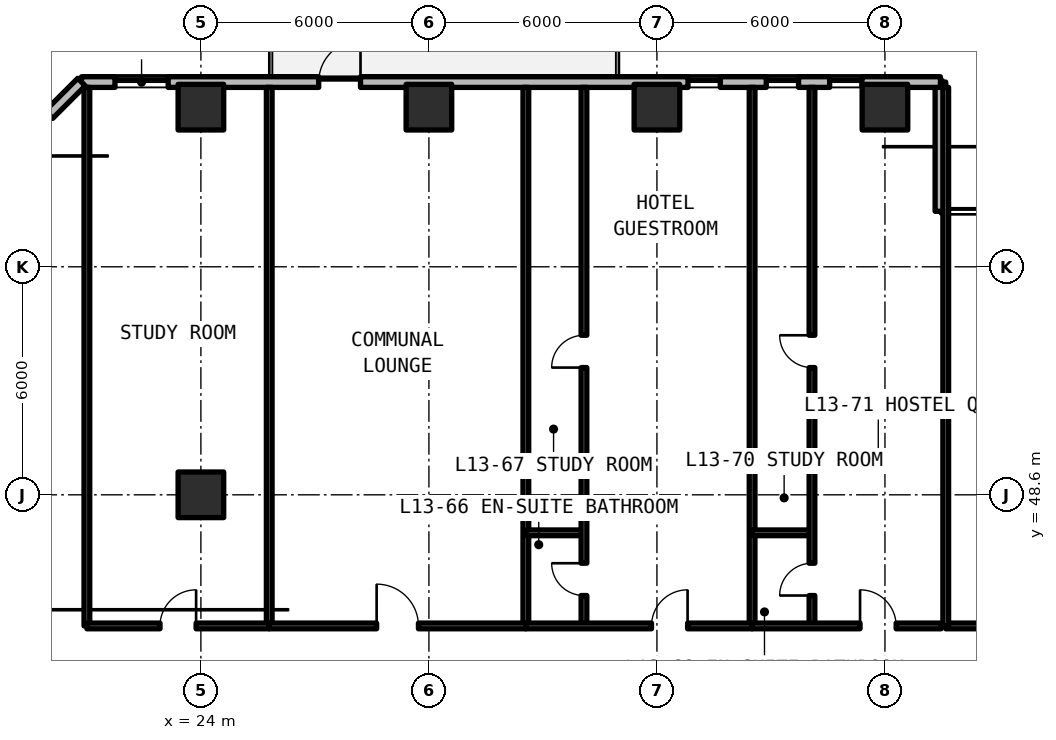
"""IFC4 building model, lengths in metres.
Left out: names, types, materials, properties, quantities, classifications, styles, units other than length and angle.
Written with IfcOpenShell. Run it as: python <this file> out.ifc"""

import sys

from ifc_helpers import new_model, si_unit, direction, frame, frame_2d, origin, origin_2d, place, context, subcontext, project, spatial, rectangle, extrude, element, fill, save


model = new_model("IFC4")
c1 = context("Model", 3, precision=1e-05, world=origin(), true_north=direction((0.0, 1.0)))
c2 = subcontext(c1, "Body", "Model", "MODEL_VIEW")
j1 = project(units=[si_unit("LENGTHUNIT", "METRE"), si_unit("PLANEANGLEUNIT", "RADIAN")], contexts=[c1])
p1 = place(None, origin())
s1 = spatial("IfcSite", under=j1, at=p1, CompositionType="ELEMENT")
p2 = place(p1, origin())
s2 = spatial("IfcBuilding", under=s1, at=p2, CompositionType="ELEMENT")
p3 = place(p2, frame((0.0, 0.0, 48.84)))
s3 = spatial("IfcBuildingStorey", under=s2, at=p3, CompositionType="ELEMENT", Elevation=48.84)
for number, where, z_axis, x_axis in (
    (1, (24.0, 48.6, 0.0), (0.0, 0.0, 1.0), (1.0, 0.0, 0.0)),
    (2, (24.0, 58.8, 0.0), (0.0, 0.0, 1.0), (1.0, 0.0, 0.0)),
    (3, (30.0, 58.8, 0.0), (0.0, 0.0, 1.0), (1.0, 0.0, 0.0)),
    (4, (36.0, 58.8, 0.0), (0.0, 0.0, 1.0), (1.0, 0.0, 0.0)),
    (5, (42.0, 58.8, 0.0), (0.0, 0.0, 1.0), (1.0, 0.0, 0.0)),
):
    element("IfcColumn", number, at=place(p3, frame(where, z_axis=z_axis, x_axis=x_axis)), inside=s3, PredefinedType="COLUMN", context=c2, shape_type="SweptSolid", body=[
        extrude(rectangle(XDim=1.2, YDim=1.2, at=origin_2d()), origin(), (0.0, 0.0, 1.0), 3.3),
    ])
p4 = place(p3, frame((43.46, 56.06, 0.0), z_axis=(0.0, 0.0, 1.0), x_axis=(0.0, 1.0, 0.0)))
e6 = element("IfcWall", 6, at=p4, inside=s3, PredefinedType="SOLIDWALL", context=c2, shape_type="SweptSolid", body=[
    extrude(rectangle(XDim=3.4, YDim=0.28, at=frame_2d((1.7, 0.0))), origin(), (0.0, 0.0, 1.0), 3.08),
])
p5 = place(p3, frame((43.46, 59.46, 0.0), z_axis=(0.0, 0.0, 1.0), x_axis=(-1.0, 0.0, 0.0)))
e7 = element("IfcWall", 7, at=p5, inside=s3, PredefinedType="SOLIDWALL", context=c2, shape_type="SweptSolid", body=[
    extrude(rectangle(XDim=22.602, YDim=0.28, at=frame_2d((11.301, 0.0))), origin(), (0.0, 0.0, 1.0), 3.08),
])
p6 = place(p5, frame((15.26, 0.0, 0.0)))
e8 = element("IfcOpeningElement", 8, at=p6, cuts=e7, PredefinedType="OPENING", context=c2, shape_type="SweptSolid", body=[
    extrude(rectangle(XDim=1.1, YDim=2.15, at=frame_2d((0.55, 1.075))), frame((0.0, 0.15, 0.0), z_axis=(0.0, -1.0, 0.0), x_axis=(1.0, 0.0, 0.0)), (0.0, 0.0, 1.0), 0.3),
])
p7 = place(p5, frame((20.321, 0.0, 0.78)))
e9 = element("IfcOpeningElement", 9, at=p7, cuts=e7, PredefinedType="OPENING", context=c2, shape_type="SweptSolid", body=[
    extrude(rectangle(XDim=1.4, YDim=1.65, at=frame_2d((0.7, 0.825))), frame((0.0, 0.15, 0.0), z_axis=(0.0, -1.0, 0.0), x_axis=(1.0, 0.0, 0.0)), (0.0, 0.0, 1.0), 0.3),
])
p8 = place(p5, frame((5.793, 0.0, 0.78)))
e10 = element("IfcOpeningElement", 10, at=p8, cuts=e7, PredefinedType="OPENING", context=c2, shape_type="SweptSolid", body=[
    extrude(rectangle(XDim=0.85, YDim=1.65, at=frame_2d((0.425, 0.825))), frame((0.0, 0.15, 0.0), z_axis=(0.0, -1.0, 0.0), x_axis=(1.0, 0.0, 0.0)), (0.0, 0.0, 1.0), 0.3),
])
p9 = place(p5, frame((3.733, 0.0, 0.78)))
e11 = element("IfcOpeningElement", 11, at=p9, cuts=e7, PredefinedType="OPENING", context=c2, shape_type="SweptSolid", body=[
    extrude(rectangle(XDim=0.85, YDim=1.65, at=frame_2d((0.425, 0.825))), frame((0.0, 0.15, 0.0), z_axis=(0.0, -1.0, 0.0), x_axis=(1.0, 0.0, 0.0)), (0.0, 0.0, 1.0), 0.3),
])
p10 = place(p5, frame((2.065, 0.0, 0.78)))
e12 = element("IfcOpeningElement", 12, at=p10, cuts=e7, PredefinedType="OPENING", context=c2, shape_type="SweptSolid", body=[
    extrude(rectangle(XDim=0.85, YDim=1.65, at=frame_2d((0.425, 0.825))), frame((0.0, 0.15, 0.0), z_axis=(0.0, -1.0, 0.0), x_axis=(1.0, 0.0, 0.0)), (0.0, 0.0, 1.0), 0.3),
])
p11 = place(p3, frame((20.858, 59.46, 0.0), z_axis=(0.0, 0.0, 1.0), x_axis=(-0.707106781187, -0.707106781187, 0.0)))
e13 = element("IfcWall", 13, at=p11, inside=s3, PredefinedType="SOLIDWALL", context=c2, shape_type="SweptSolid", body=[
    extrude(rectangle(XDim=5.824, YDim=0.28, at=frame_2d((2.912, 0.0))), origin(), (0.0, 0.0, 1.0), 3.08),
])
p12 = place(p11, frame((1.212, 0.0, 0.78)))
e14 = element("IfcOpeningElement", 14, at=p12, cuts=e13, PredefinedType="OPENING", context=c2, shape_type="SweptSolid", body=[
    extrude(rectangle(XDim=3.4, YDim=1.66, at=frame_2d((1.7, 0.83))), frame((0.0, 0.15, 0.0), z_axis=(0.0, -1.0, 0.0), x_axis=(1.0, 0.0, 0.0)), (0.0, 0.0, 1.0), 0.3),
])
p13 = place(p3, frame((43.6, 45.15, 0.0), z_axis=(0.0, 0.0, 1.0), x_axis=(1.0, 0.0, 0.0)))
e15 = element("IfcWall", 15, at=p13, inside=s3, PredefinedType="SOLIDWALL", context=c2, shape_type="SweptSolid", body=[
    extrude(rectangle(XDim=8.4, YDim=0.15, at=frame_2d((4.2, 0.0))), origin(), (0.0, 0.0, 1.0), 2.35),
])
p14 = place(p13, frame((3.65, 0.0, 0.0)))
e16 = element("IfcOpeningElement", 16, at=p14, cuts=e15, PredefinedType="OPENING", context=c2, shape_type="SweptSolid", body=[
    extrude(rectangle(XDim=1.1, YDim=2.15, at=frame_2d((0.55, 1.075))), frame((0.0, 0.085, 0.0), z_axis=(0.0, -1.0, 0.0), x_axis=(1.0, 0.0, 0.0)), (0.0, 0.0, 1.0), 0.17),
])
for number, where, z_axis, x_axis in (
    (17, (43.6, 45.15, 0.0), (0.0, 0.0, 1.0), (0.0, 1.0, 0.0)),
    (18, (21.0, 45.15, 0.0), (0.0, 0.0, 1.0), (0.0, 1.0, 0.0)),
    (19, (25.798, 45.15, 0.0), (0.0, 0.0, 1.0), (0.0, 1.0, 0.0)),
):
    element("IfcWall", number, at=place(p3, frame(where, z_axis=z_axis, x_axis=x_axis)), inside=s3, PredefinedType="SOLIDWALL", context=c2, shape_type="SweptSolid", body=[
        extrude(rectangle(XDim=14.17, YDim=0.15, at=frame_2d((7.085, 0.0))), origin(), (0.0, 0.0, 1.0), 2.35),
    ])
p15 = place(p3, frame((21.0, 45.15, 0.0), z_axis=(0.0, 0.0, 1.0), x_axis=(1.0, 0.0, 0.0)))
e20 = element("IfcWall", 20, at=p15, inside=s3, PredefinedType="SOLIDWALL", context=c2, shape_type="SweptSolid", body=[
    extrude(rectangle(XDim=4.798, YDim=0.15, at=frame_2d((2.399, 0.0))), origin(), (0.0, 0.0, 1.0), 2.35),
])
p16 = place(p15, frame((1.924, 0.0, 0.0)))
e21 = element("IfcOpeningElement", 21, at=p16, cuts=e20, PredefinedType="OPENING", context=c2, shape_type="SweptSolid", body=[
    extrude(rectangle(XDim=0.95, YDim=2.15, at=frame_2d((0.475, 1.075))), frame((0.0, 0.085, 0.0), z_axis=(0.0, -1.0, 0.0), x_axis=(1.0, 0.0, 0.0)), (0.0, 0.0, 1.0), 0.17),
])
p17 = place(p3, frame((32.551, 45.15, 0.0), z_axis=(0.0, 0.0, 1.0), x_axis=(0.0, 1.0, 0.0)))
e22 = element("IfcWall", 22, at=p17, inside=s3, PredefinedType="SOLIDWALL", context=c2, shape_type="SweptSolid", body=[
    extrude(rectangle(XDim=14.17, YDim=0.15, at=frame_2d((7.085, 0.0))), origin(), (0.0, 0.0, 1.0), 2.35),
])
p18 = place(p3, frame((25.798, 45.15, 0.0), z_axis=(0.0, 0.0, 1.0), x_axis=(1.0, 0.0, 0.0)))
e23 = element("IfcWall", 23, at=p18, inside=s3, PredefinedType="SOLIDWALL", context=c2, shape_type="SweptSolid", body=[
    extrude(rectangle(XDim=6.753, YDim=0.15, at=frame_2d((3.376, 0.0))), origin(), (0.0, 0.0, 1.0), 2.35),
])
p19 = place(p18, frame((2.826, 0.0, 0.0)))
e24 = element("IfcOpeningElement", 24, at=p19, cuts=e23, PredefinedType="OPENING", context=c2, shape_type="SweptSolid", body=[
    extrude(rectangle(XDim=1.1, YDim=2.15, at=frame_2d((0.55, 1.075))), frame((0.0, 0.085, 0.0), z_axis=(0.0, -1.0, 0.0), x_axis=(1.0, 0.0, 0.0)), (0.0, 0.0, 1.0), 0.17),
])
p20 = place(p3, frame((38.504, 45.15, 0.0), z_axis=(0.0, 0.0, 1.0), x_axis=(0.0, 1.0, 0.0)))
e25 = element("IfcWall", 25, at=p20, inside=s3, PredefinedType="SOLIDWALL", context=c2, shape_type="SweptSolid", body=[
    extrude(rectangle(XDim=14.17, YDim=0.15, at=frame_2d((7.085, 0.0))), origin(), (0.0, 0.0, 1.0), 2.35),
])
p21 = place(p3, frame((32.551, 47.6, 0.0), z_axis=(0.0, 0.0, 1.0), x_axis=(1.0, 0.0, 0.0)))
e26 = element("IfcWall", 26, at=p21, inside=s3, PredefinedType="PARTITIONING", context=c2, shape_type="SweptSolid", body=[
    extrude(rectangle(XDim=1.529, YDim=0.15, at=frame_2d((0.765, 0.0))), origin(), (0.0, 0.0, 1.0), 2.35),
])
p22 = place(p3, frame((34.08, 45.15, 0.0), z_axis=(0.0, 0.0, 1.0), x_axis=(0.0, 1.0, 0.0)))
e27 = element("IfcWall", 27, at=p22, inside=s3, PredefinedType="PARTITIONING", context=c2, shape_type="SweptSolid", body=[
    extrude(rectangle(XDim=14.17, YDim=0.15, at=frame_2d((7.085, 0.0))), origin(), (0.0, 0.0, 1.0), 2.35),
])
p23 = place(p22, frame((0.8, 0.0, 0.0)))
e28 = element("IfcOpeningElement", 28, at=p23, cuts=e27, PredefinedType="OPENING", context=c2, shape_type="SweptSolid", body=[
    extrude(rectangle(XDim=0.85, YDim=2.1, at=frame_2d((0.425, 1.05))), frame((0.0, 0.085, 0.0), z_axis=(0.0, -1.0, 0.0), x_axis=(1.0, 0.0, 0.0)), (0.0, 0.0, 1.0), 0.17),
])
p24 = place(p22, frame((6.798, 0.0, 0.0)))
e29 = element("IfcOpeningElement", 29, at=p24, cuts=e27, PredefinedType="OPENING", context=c2, shape_type="SweptSolid", body=[
    extrude(rectangle(XDim=0.85, YDim=2.1, at=frame_2d((0.425, 1.05))), frame((0.0, 0.085, 0.0), z_axis=(0.0, -1.0, 0.0), x_axis=(1.0, 0.0, 0.0)), (0.0, 0.0, 1.0), 0.17),
])
p25 = place(p3, frame((32.551, 45.15, 0.0), z_axis=(0.0, 0.0, 1.0), x_axis=(1.0, 0.0, 0.0)))
e30 = element("IfcWall", 30, at=p25, inside=s3, PredefinedType="SOLIDWALL", context=c2, shape_type="SweptSolid", body=[
    extrude(rectangle(XDim=5.953, YDim=0.15, at=frame_2d((2.977, 0.0))), origin(), (0.0, 0.0, 1.0), 2.35),
])
p26 = place(p25, frame((3.306, 0.0, 0.0)))
e31 = element("IfcOpeningElement", 31, at=p26, cuts=e30, PredefinedType="OPENING", context=c2, shape_type="SweptSolid", body=[
    extrude(rectangle(XDim=0.95, YDim=2.15, at=frame_2d((0.475, 1.075))), frame((0.0, 0.085, 0.0), z_axis=(0.0, -1.0, 0.0), x_axis=(1.0, 0.0, 0.0)), (0.0, 0.0, 1.0), 0.17),
])
p27 = place(p3, frame((38.504, 47.6, 0.0), z_axis=(0.0, 0.0, 1.0), x_axis=(1.0, 0.0, 0.0)))
e32 = element("IfcWall", 32, at=p27, inside=s3, PredefinedType="PARTITIONING", context=c2, shape_type="SweptSolid", body=[
    extrude(rectangle(XDim=1.576, YDim=0.15, at=frame_2d((0.788, 0.0))), origin(), (0.0, 0.0, 1.0), 2.35),
])
p28 = place(p3, frame((40.08, 45.15, 0.0), z_axis=(0.0, 0.0, 1.0), x_axis=(0.0, 1.0, 0.0)))
e33 = element("IfcWall", 33, at=p28, inside=s3, PredefinedType="PARTITIONING", context=c2, shape_type="SweptSolid", body=[
    extrude(rectangle(XDim=14.17, YDim=0.15, at=frame_2d((7.085, 0.0))), origin(), (0.0, 0.0, 1.0), 2.35),
])
p29 = place(p28, frame((0.8, 0.0, 0.0)))
e34 = element("IfcOpeningElement", 34, at=p29, cuts=e33, PredefinedType="OPENING", context=c2, shape_type="SweptSolid", body=[
    extrude(rectangle(XDim=0.85, YDim=2.1, at=frame_2d((0.425, 1.05))), frame((0.0, 0.085, 0.0), z_axis=(0.0, -1.0, 0.0), x_axis=(1.0, 0.0, 0.0)), (0.0, 0.0, 1.0), 0.17),
])
p30 = place(p28, frame((6.798, 0.0, 0.0)))
e35 = element("IfcOpeningElement", 35, at=p30, cuts=e33, PredefinedType="OPENING", context=c2, shape_type="SweptSolid", body=[
    extrude(rectangle(XDim=0.85, YDim=2.1, at=frame_2d((0.425, 1.05))), frame((0.0, 0.085, 0.0), z_axis=(0.0, -1.0, 0.0), x_axis=(1.0, 0.0, 0.0)), (0.0, 0.0, 1.0), 0.17),
])
p31 = place(p3, frame((38.504, 45.15, 0.0), z_axis=(0.0, 0.0, 1.0), x_axis=(1.0, 0.0, 0.0)))
e36 = element("IfcWall", 36, at=p31, inside=s3, PredefinedType="SOLIDWALL", context=c2, shape_type="SweptSolid", body=[
    extrude(rectangle(XDim=4.976, YDim=0.15, at=frame_2d((2.488, 0.0))), origin(), (0.0, 0.0, 1.0), 2.35),
])
p32 = place(p31, frame((2.841, 0.0, 0.0)))
e37 = element("IfcOpeningElement", 37, at=p32, cuts=e36, PredefinedType="OPENING", context=c2, shape_type="SweptSolid", body=[
    extrude(rectangle(XDim=0.95, YDim=2.15, at=frame_2d((0.475, 1.075))), frame((0.0, 0.085, 0.0), z_axis=(0.0, -1.0, 0.0), x_axis=(1.0, 0.0, 0.0)), (0.0, 0.0, 1.0), 0.17),
])
p33 = place(p6, frame((1.1, 0.0, 0.0), z_axis=(0.0, 0.0, 1.0), x_axis=(-1.0, 0.0, 0.0)))
e38 = element("IfcDoor", 38, at=p33, inside=s3, OperationType="SINGLE_SWING_LEFT", PredefinedType="DOOR", context=c2, shape_type="SweptSolid", body=[
    extrude(rectangle(XDim=1.1, YDim=2.15, at=frame_2d((0.55, 1.075))), frame((0.0, 0.025, 0.0), z_axis=(0.0, -1.0, 0.0), x_axis=(1.0, 0.0, 0.0)), (0.0, 0.0, 1.0), 0.05),
])
fill(e8, e38)
p34 = place(p7, origin())
e39 = element("IfcWindow", 39, at=p34, inside=s3, PartitioningType="SINGLE_PANEL", PredefinedType="WINDOW", context=c2, shape_type="SweptSolid", body=[
    extrude(rectangle(XDim=1.4, YDim=1.65, at=frame_2d((0.7, 0.825))), frame((0.0, 0.03, 0.0), z_axis=(0.0, -1.0, 0.0), x_axis=(1.0, 0.0, 0.0)), (0.0, 0.0, 1.0), 0.06),
])
fill(e9, e39)
p35 = place(p8, origin())
e40 = element("IfcWindow", 40, at=p35, inside=s3, PartitioningType="SINGLE_PANEL", PredefinedType="WINDOW", context=c2, shape_type="SweptSolid", body=[
    extrude(rectangle(XDim=0.85, YDim=1.65, at=frame_2d((0.425, 0.825))), frame((0.0, 0.03, 0.0), z_axis=(0.0, -1.0, 0.0), x_axis=(1.0, 0.0, 0.0)), (0.0, 0.0, 1.0), 0.06),
])
fill(e10, e40)
p36 = place(p9, origin())
e41 = element("IfcWindow", 41, at=p36, inside=s3, PartitioningType="SINGLE_PANEL", PredefinedType="WINDOW", context=c2, shape_type="SweptSolid", body=[
    extrude(rectangle(XDim=0.85, YDim=1.65, at=frame_2d((0.425, 0.825))), frame((0.0, 0.03, 0.0), z_axis=(0.0, -1.0, 0.0), x_axis=(1.0, 0.0, 0.0)), (0.0, 0.0, 1.0), 0.06),
])
fill(e11, e41)
p37 = place(p10, origin())
e42 = element("IfcWindow", 42, at=p37, inside=s3, PartitioningType="SINGLE_PANEL", PredefinedType="WINDOW", context=c2, shape_type="SweptSolid", body=[
    extrude(rectangle(XDim=0.85, YDim=1.65, at=frame_2d((0.425, 0.825))), frame((0.0, 0.03, 0.0), z_axis=(0.0, -1.0, 0.0), x_axis=(1.0, 0.0, 0.0)), (0.0, 0.0, 1.0), 0.06),
])
fill(e12, e42)
p38 = place(p16, origin())
e43 = element("IfcDoor", 43, at=p38, inside=s3, OperationType="SINGLE_SWING_RIGHT", PredefinedType="DOOR", context=c2, shape_type="SweptSolid", body=[
    extrude(rectangle(XDim=0.95, YDim=2.15, at=frame_2d((0.475, 1.075))), frame((0.0, 0.025, 0.0), z_axis=(0.0, -1.0, 0.0), x_axis=(1.0, 0.0, 0.0)), (0.0, 0.0, 1.0), 0.05),
])
fill(e21, e43)
p39 = place(p19, origin())
e44 = element("IfcDoor", 44, at=p39, inside=s3, OperationType="SINGLE_SWING_LEFT", PredefinedType="DOOR", context=c2, shape_type="SweptSolid", body=[
    extrude(rectangle(XDim=1.1, YDim=2.15, at=frame_2d((0.55, 1.075))), frame((0.0, 0.025, 0.0), z_axis=(0.0, -1.0, 0.0), x_axis=(1.0, 0.0, 0.0)), (0.0, 0.0, 1.0), 0.05),
])
fill(e24, e44)
p40 = place(p23, origin())
e45 = element("IfcDoor", 45, at=p40, inside=s3, OperationType="SINGLE_SWING_RIGHT", PredefinedType="DOOR", context=c2, shape_type="SweptSolid", body=[
    extrude(rectangle(XDim=0.85, YDim=2.1, at=frame_2d((0.425, 1.05))), frame((0.0, 0.025, 0.0), z_axis=(0.0, -1.0, 0.0), x_axis=(1.0, 0.0, 0.0)), (0.0, 0.0, 1.0), 0.05),
])
fill(e28, e45)
p41 = place(p24, origin())
e46 = element("IfcDoor", 46, at=p41, inside=s3, OperationType="SINGLE_SWING_LEFT", PredefinedType="DOOR", context=c2, shape_type="SweptSolid", body=[
    extrude(rectangle(XDim=0.85, YDim=2.1, at=frame_2d((0.425, 1.05))), frame((0.0, 0.025, 0.0), z_axis=(0.0, -1.0, 0.0), x_axis=(1.0, 0.0, 0.0)), (0.0, 0.0, 1.0), 0.05),
])
fill(e29, e46)
p42 = place(p26, origin())
e47 = element("IfcDoor", 47, at=p42, inside=s3, OperationType="SINGLE_SWING_RIGHT", PredefinedType="DOOR", context=c2, shape_type="SweptSolid", body=[
    extrude(rectangle(XDim=0.95, YDim=2.15, at=frame_2d((0.475, 1.075))), frame((0.0, 0.025, 0.0), z_axis=(0.0, -1.0, 0.0), x_axis=(1.0, 0.0, 0.0)), (0.0, 0.0, 1.0), 0.05),
])
fill(e31, e47)
p43 = place(p29, origin())
e48 = element("IfcDoor", 48, at=p43, inside=s3, OperationType="SINGLE_SWING_LEFT", PredefinedType="DOOR", context=c2, shape_type="SweptSolid", body=[
    extrude(rectangle(XDim=0.85, YDim=2.1, at=frame_2d((0.425, 1.05))), frame((0.0, 0.025, 0.0), z_axis=(0.0, -1.0, 0.0), x_axis=(1.0, 0.0, 0.0)), (0.0, 0.0, 1.0), 0.05),
])
fill(e34, e48)
p44 = place(p30, origin())
e49 = element("IfcDoor", 49, at=p44, inside=s3, OperationType="SINGLE_SWING_RIGHT", PredefinedType="DOOR", context=c2, shape_type="SweptSolid", body=[
    extrude(rectangle(XDim=0.85, YDim=2.1, at=frame_2d((0.425, 1.05))), frame((0.0, 0.025, 0.0), z_axis=(0.0, -1.0, 0.0), x_axis=(1.0, 0.0, 0.0)), (0.0, 0.0, 1.0), 0.05),
])
fill(e35, e49)
p45 = place(p32, origin())
e50 = element("IfcDoor", 50, at=p45, inside=s3, OperationType="SINGLE_SWING_LEFT", PredefinedType="DOOR", context=c2, shape_type="SweptSolid", body=[
    extrude(rectangle(XDim=0.95, YDim=2.15, at=frame_2d((0.475, 1.075))), frame((0.0, 0.025, 0.0), z_axis=(0.0, -1.0, 0.0), x_axis=(1.0, 0.0, 0.0)), (0.0, 0.0, 1.0), 0.05),
])
fill(e37, e50)
save(model, sys.argv[1])
